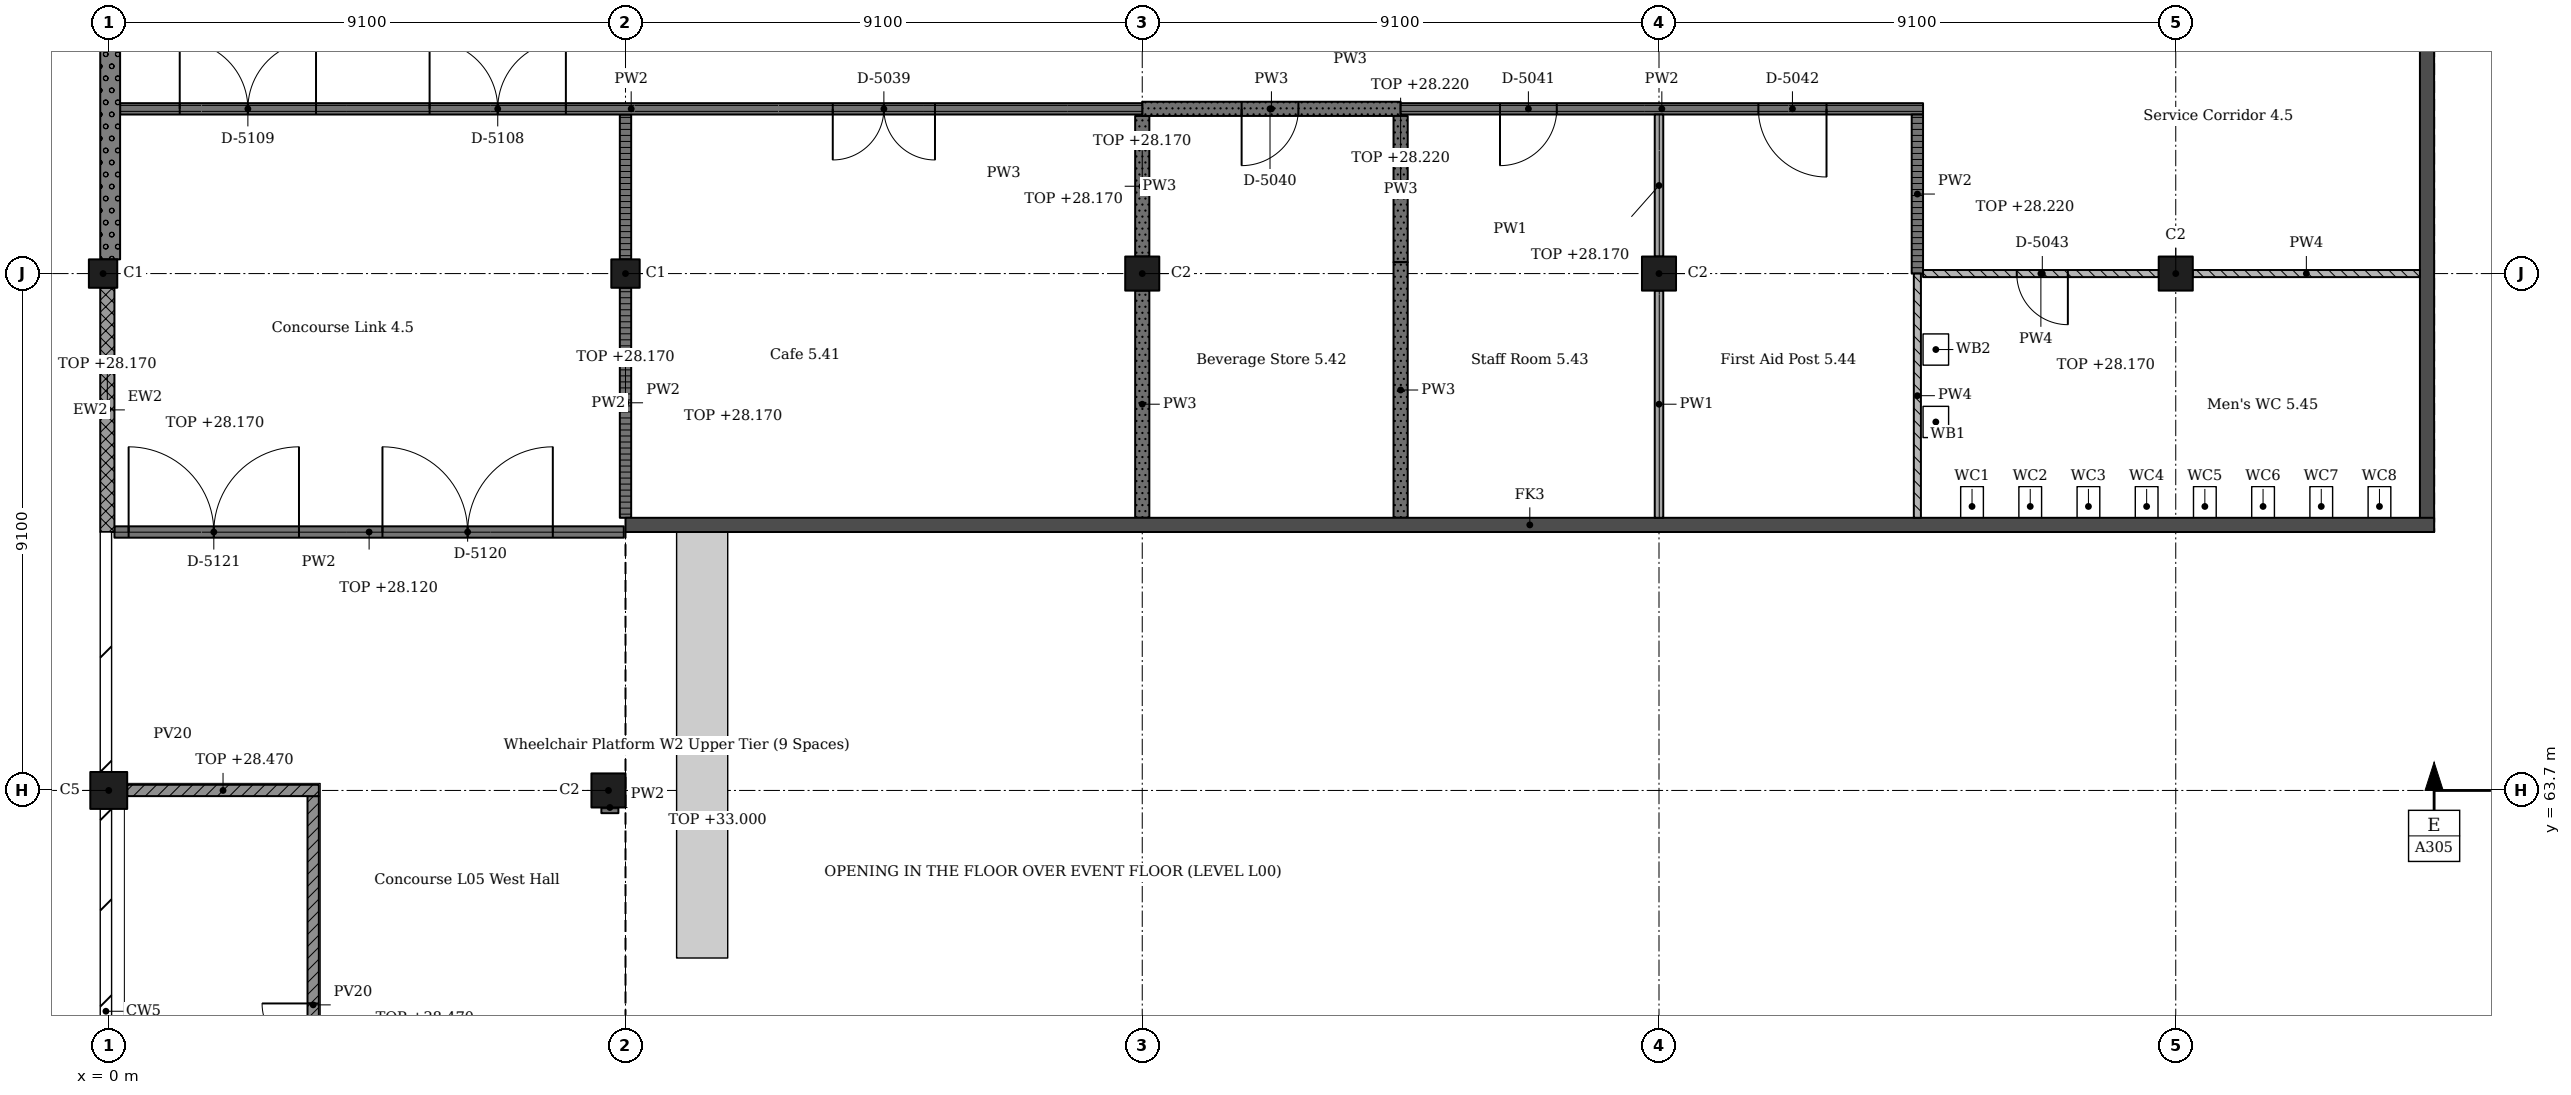
"""IFC4 building model, lengths in metres.
Left out: names, types, materials, properties, quantities, classifications, styles, units other than length and angle.
Written with IfcOpenShell. Run it as: python <this file> out.ifc"""

import sys

from ifc_helpers import new_model, si_unit, direction, frame, frame_2d, origin, origin_2d, place, context, subcontext, project, spatial, rectangle, extrude, element, fill, save


model = new_model("IFC4")
c1 = context("Model", 3, precision=1e-05, world=origin(), true_north=direction((0.0, 1.0)))
c2 = subcontext(c1, "Body", "Model", "MODEL_VIEW")
j1 = project(units=[si_unit("LENGTHUNIT", "METRE"), si_unit("PLANEANGLEUNIT", "RADIAN")], contexts=[c1])
p1 = place(None, origin())
s1 = spatial("IfcSite", under=j1, at=p1, CompositionType="ELEMENT")
p2 = place(p1, origin())
s2 = spatial("IfcBuilding", under=s1, at=p2, CompositionType="ELEMENT")
p3 = place(p2, frame((0.0, 0.0, 24.57)))
s3 = spatial("IfcBuildingStorey", under=s2, at=p3, CompositionType="ELEMENT", Elevation=24.57)
p4 = place(p3, frame((0.0, 63.7, 0.0), z_axis=(0.0, 0.0, 1.0), x_axis=(1.0, 0.0, 0.0)))
e1 = element("IfcColumn", 1, at=p4, inside=s3, PredefinedType="COLUMN", context=c2, shape_type="SweptSolid", body=[
    extrude(rectangle(XDim=0.65, YDim=0.65, at=origin_2d()), origin(), (0.0, 0.0, 1.0), 4.55),
])
p5 = place(p3, frame((-0.1, 72.8, 0.0), z_axis=(0.0, 0.0, 1.0), x_axis=(1.0, 0.0, 0.0)))
e2 = element("IfcColumn", 2, at=p5, inside=s3, PredefinedType="COLUMN", context=c2, shape_type="SweptSolid", body=[
    extrude(rectangle(XDim=0.5, YDim=0.5, at=origin_2d()), origin(), (0.0, 0.0, 1.0), 4.55),
])
p6 = place(p3, frame((8.8, 63.7, 0.0), z_axis=(0.0, 0.0, 1.0), x_axis=(1.0, 0.0, 0.0)))
e3 = element("IfcColumn", 3, at=p6, inside=s3, PredefinedType="COLUMN", context=c2, shape_type="SweptSolid", body=[
    extrude(rectangle(XDim=0.6, YDim=0.6, at=origin_2d()), origin(), (0.0, 0.0, 1.0), 4.55),
])
p7 = place(p3, frame((9.1, 72.8, 0.0), z_axis=(0.0, 0.0, 1.0), x_axis=(1.0, 0.0, 0.0)))
e4 = element("IfcColumn", 4, at=p7, inside=s3, PredefinedType="COLUMN", context=c2, shape_type="SweptSolid", body=[
    extrude(rectangle(XDim=0.5, YDim=0.5, at=origin_2d()), origin(), (0.0, 0.0, 1.0), 4.55),
])
for number, where, z_axis, x_axis in (
    (5, (18.2, 72.8, 0.0), (0.0, 0.0, 1.0), (1.0, 0.0, 0.0)),
    (6, (27.3, 72.8, 0.0), (0.0, 0.0, 1.0), (1.0, 0.0, 0.0)),
    (7, (36.4, 72.8, 0.0), (0.0, 0.0, 1.0), (1.0, 0.0, 0.0)),
):
    element("IfcColumn", number, at=place(p3, frame(where, z_axis=z_axis, x_axis=x_axis)), inside=s3, PredefinedType="COLUMN", context=c2, shape_type="SweptSolid", body=[
        extrude(rectangle(XDim=0.6, YDim=0.6, at=origin_2d()), origin(), (0.0, 0.0, 1.0), 4.55),
    ])
p8 = place(p3, frame((40.825, 68.25, 0.0), z_axis=(0.0, 0.0, 1.0), x_axis=(0.0, 1.0, 0.0)))
e8 = element("IfcWall", 8, at=p8, inside=s3, PredefinedType="SHEAR", context=c2, shape_type="SweptSolid", body=[
    extrude(rectangle(XDim=31.85, YDim=0.25, at=frame_2d((15.925, 0.0))), origin(), (0.0, 0.0, 1.0), 4.55),
])
p9 = place(p3, frame((40.95, 68.375, 0.0), z_axis=(0.0, 0.0, 1.0), x_axis=(-1.0, 0.0, 0.0)))
e9 = element("IfcWall", 9, at=p9, inside=s3, PredefinedType="SHEAR", context=c2, shape_type="SweptSolid", body=[
    extrude(rectangle(XDim=31.85, YDim=0.25, at=frame_2d((15.925, 0.0))), origin(), (0.0, 0.0, 1.0), 4.55),
])
p10 = place(p3, frame((0.025, 81.65, 0.0), z_axis=(0.0, 0.0, 1.0), x_axis=(0.0, -1.0, 0.0)))
e10 = element("IfcWall", 10, at=p10, inside=s3, PredefinedType="SOLIDWALL", context=c2, shape_type="SweptSolid", body=[
    extrude(rectangle(XDim=8.6, YDim=0.35, at=frame_2d((4.3, 0.0))), origin(), (0.0, 0.0, 1.0), 3.6),
])
p11 = place(p3, frame((-0.025, 72.55, 0.0), z_axis=(0.0, 0.0, 1.0), x_axis=(0.0, -1.0, 0.0)))
e11 = element("IfcWall", 11, at=p11, inside=s3, PredefinedType="SOLIDWALL", context=c2, shape_type="SweptSolid", body=[
    extrude(rectangle(XDim=4.3, YDim=0.25, at=frame_2d((2.15, 0.0))), origin(), (0.0, 0.0, 1.0), 3.6),
])
p12 = place(p3, frame((3.6, 54.6, 0.0), z_axis=(0.0, 0.0, 1.0), x_axis=(0.0, 1.0, 0.0)))
e12 = element("IfcWall", 12, at=p12, inside=s3, PredefinedType="PARTITIONING", context=c2, shape_type="SweptSolid", body=[
    extrude(rectangle(XDim=9.0, YDim=0.2, at=frame_2d((4.5, 0.0))), origin(), (0.0, 0.0, 1.0), 3.9),
])
p13 = place(p12, frame((3.55, 0.0, 0.0)))
e13 = element("IfcOpeningElement", 13, at=p13, cuts=e12, PredefinedType="OPENING", context=c2, shape_type="SweptSolid", body=[
    extrude(rectangle(XDim=1.8, YDim=2.1, at=frame_2d((0.9, 1.05))), frame((0.0, 0.11, 0.0), z_axis=(0.0, -1.0, 0.0), x_axis=(1.0, 0.0, 0.0)), (0.0, 0.0, 1.0), 0.22),
])
p14 = place(p3, frame((0.1, 68.25, 0.0), z_axis=(0.0, 0.0, 1.0), x_axis=(1.0, 0.0, 0.0)))
e14 = element("IfcWall", 14, at=p14, inside=s3, PredefinedType="PARTITIONING", context=c2, shape_type="SweptSolid", body=[
    extrude(rectangle(XDim=8.97, YDim=0.2, at=frame_2d((4.485, 0.0))), origin(), (0.0, 0.0, 1.0), 3.55),
])
p15 = place(p14, frame((4.72, 0.0, 0.0)))
e15 = element("IfcOpeningElement", 15, at=p15, cuts=e14, PredefinedType="OPENING", context=c2, shape_type="SweptSolid", body=[
    extrude(rectangle(XDim=3.0, YDim=2.4, at=frame_2d((1.5, 1.2))), frame((0.0, 0.11, 0.0), z_axis=(0.0, -1.0, 0.0), x_axis=(1.0, 0.0, 0.0)), (0.0, 0.0, 1.0), 0.22),
])
p16 = place(p14, frame((0.25, 0.0, 0.0)))
e16 = element("IfcOpeningElement", 16, at=p16, cuts=e14, PredefinedType="OPENING", context=c2, shape_type="SweptSolid", body=[
    extrude(rectangle(XDim=3.0, YDim=2.4, at=frame_2d((1.5, 1.2))), frame((0.0, 0.11, 0.0), z_axis=(0.0, -1.0, 0.0), x_axis=(1.0, 0.0, 0.0)), (0.0, 0.0, 1.0), 0.22),
])
p17 = place(p3, frame((3.7, 63.7, 0.0), z_axis=(0.0, 0.0, 1.0), x_axis=(-1.0, 0.0, 0.0)))
e17 = element("IfcWall", 17, at=p17, inside=s3, PredefinedType="PARTITIONING", context=c2, shape_type="SweptSolid", body=[
    extrude(rectangle(XDim=3.375, YDim=0.2, at=frame_2d((1.688, 0.0))), origin(), (0.0, 0.0, 1.0), 3.9),
])
p18 = place(p3, frame((8.675, 63.4, 0.0), z_axis=(0.0, 0.0, 1.0), x_axis=(1.0, 0.0, 0.0)))
e18 = element("IfcWall", 18, at=p18, inside=s3, PredefinedType="PARTITIONING", context=c2, shape_type="SweptSolid", body=[
    extrude(rectangle(XDim=0.3, YDim=0.2, at=frame_2d((0.15, 0.0))), origin(), (0.0, 0.0, 1.0), 8.43),
])
p19 = place(p3, frame((9.1, 68.5, 0.0), z_axis=(0.0, 0.0, 1.0), x_axis=(0.0, 1.0, 0.0)))
e19 = element("IfcWall", 19, at=p19, inside=s3, PredefinedType="PARTITIONING", context=c2, shape_type="SweptSolid", body=[
    extrude(rectangle(XDim=4.05, YDim=0.2, at=frame_2d((2.025, 0.0))), origin(), (0.0, 0.0, 1.0), 3.6),
])
p20 = place(p3, frame((9.1, 73.05, 0.0), z_axis=(0.0, 0.0, 1.0), x_axis=(0.0, 1.0, 0.0)))
e20 = element("IfcWall", 20, at=p20, inside=s3, PredefinedType="PARTITIONING", context=c2, shape_type="SweptSolid", body=[
    extrude(rectangle(XDim=2.55, YDim=0.2, at=frame_2d((1.275, 0.0))), origin(), (0.0, 0.0, 1.0), 3.6),
])
p21 = place(p3, frame((0.2, 75.7, 0.0), z_axis=(0.0, 0.0, 1.0), x_axis=(1.0, 0.0, 0.0)))
e21 = element("IfcWall", 21, at=p21, inside=s3, PredefinedType="PARTITIONING", context=c2, shape_type="SweptSolid", body=[
    extrude(rectangle(XDim=18.0, YDim=0.2, at=frame_2d((9.0, 0.0))), origin(), (0.0, 0.0, 1.0), 4.35),
])
p22 = place(p21, frame((12.55, 0.0, 0.0)))
e22 = element("IfcOpeningElement", 22, at=p22, cuts=e21, PredefinedType="OPENING", context=c2, shape_type="SweptSolid", body=[
    extrude(rectangle(XDim=1.8, YDim=2.1, at=frame_2d((0.9, 1.05))), frame((0.0, 0.11, 0.0), z_axis=(0.0, -1.0, 0.0), x_axis=(1.0, 0.0, 0.0)), (0.0, 0.0, 1.0), 0.22),
])
p23 = place(p21, frame((5.45, 0.0, 0.0)))
e23 = element("IfcOpeningElement", 23, at=p23, cuts=e21, PredefinedType="OPENING", context=c2, shape_type="SweptSolid", body=[
    extrude(rectangle(XDim=2.4, YDim=2.4, at=frame_2d((1.2, 1.2))), frame((0.0, 0.11, 0.0), z_axis=(0.0, -1.0, 0.0), x_axis=(1.0, 0.0, 0.0)), (0.0, 0.0, 1.0), 0.22),
])
p24 = place(p21, frame((1.05, 0.0, 0.0)))
e24 = element("IfcOpeningElement", 24, at=p24, cuts=e21, PredefinedType="OPENING", context=c2, shape_type="SweptSolid", body=[
    extrude(rectangle(XDim=2.4, YDim=2.4, at=frame_2d((1.2, 1.2))), frame((0.0, 0.11, 0.0), z_axis=(0.0, -1.0, 0.0), x_axis=(1.0, 0.0, 0.0)), (0.0, 0.0, 1.0), 0.22),
])
p25 = place(p3, frame((18.2, 72.5, 0.0), z_axis=(0.0, 0.0, 1.0), x_axis=(0.0, -1.0, 0.0)))
e25 = element("IfcWall", 25, at=p25, inside=s3, PredefinedType="SOLIDWALL", context=c2, shape_type="SweptSolid", body=[
    extrude(rectangle(XDim=4.0, YDim=0.25, at=frame_2d((2.0, 0.0))), origin(), (0.0, 0.0, 1.0), 4.35),
])
p26 = place(p3, frame((18.2, 75.575, 0.0), z_axis=(0.0, 0.0, 1.0), x_axis=(0.0, -1.0, 0.0)))
e26 = element("IfcWall", 26, at=p26, inside=s3, PredefinedType="SOLIDWALL", context=c2, shape_type="SweptSolid", body=[
    extrude(rectangle(XDim=2.475, YDim=0.25, at=frame_2d((1.237, 0.0))), origin(), (0.0, 0.0, 1.0), 3.6),
])
p27 = place(p3, frame((18.2, 75.7, 0.0), z_axis=(0.0, 0.0, 1.0), x_axis=(1.0, 0.0, 0.0)))
e27 = element("IfcWall", 27, at=p27, inside=s3, PredefinedType="SOLIDWALL", context=c2, shape_type="SweptSolid", body=[
    extrude(rectangle(XDim=4.55, YDim=0.25, at=frame_2d((2.275, 0.0))), origin(), (0.0, 0.0, 1.0), 4.35),
])
p28 = place(p27, frame((1.75, 0.0, 0.0)))
e28 = element("IfcOpeningElement", 28, at=p28, cuts=e27, PredefinedType="OPENING", context=c2, shape_type="SweptSolid", body=[
    extrude(rectangle(XDim=1.0, YDim=2.1, at=frame_2d((0.5, 1.05))), frame((0.0, 0.135, 0.0), z_axis=(0.0, -1.0, 0.0), x_axis=(1.0, 0.0, 0.0)), (0.0, 0.0, 1.0), 0.27),
])
p29 = place(p3, frame((22.75, 75.575, 0.0), z_axis=(0.0, 0.0, 1.0), x_axis=(0.0, -1.0, 0.0)))
e29 = element("IfcWall", 29, at=p29, inside=s3, PredefinedType="SOLIDWALL", context=c2, shape_type="SweptSolid", body=[
    extrude(rectangle(XDim=2.575, YDim=0.25, at=frame_2d((1.288, 0.0))), origin(), (0.0, 0.0, 1.0), 3.65),
])
p30 = place(p3, frame((22.75, 75.7, 0.0), z_axis=(0.0, 0.0, 1.0), x_axis=(1.0, 0.0, 0.0)))
e30 = element("IfcWall", 30, at=p30, inside=s3, PredefinedType="PARTITIONING", context=c2, shape_type="SweptSolid", body=[
    extrude(rectangle(XDim=9.2, YDim=0.2, at=frame_2d((4.6, 0.0))), origin(), (0.0, 0.0, 1.0), 4.35),
])
p31 = place(p30, frame((1.75, 0.0, 0.0)))
e31 = element("IfcOpeningElement", 31, at=p31, cuts=e30, PredefinedType="OPENING", context=c2, shape_type="SweptSolid", body=[
    extrude(rectangle(XDim=1.0, YDim=2.1, at=frame_2d((0.5, 1.05))), frame((0.0, 0.11, 0.0), z_axis=(0.0, -1.0, 0.0), x_axis=(1.0, 0.0, 0.0)), (0.0, 0.0, 1.0), 0.22),
])
p32 = place(p30, frame((6.3, 0.0, 0.0)))
e32 = element("IfcOpeningElement", 32, at=p32, cuts=e30, PredefinedType="OPENING", context=c2, shape_type="SweptSolid", body=[
    extrude(rectangle(XDim=1.2, YDim=2.1, at=frame_2d((0.6, 1.05))), frame((0.0, 0.11, 0.0), z_axis=(0.0, -1.0, 0.0), x_axis=(1.0, 0.0, 0.0)), (0.0, 0.0, 1.0), 0.22),
])
p33 = place(p3, frame((27.3, 72.5, 0.0), z_axis=(0.0, 0.0, 1.0), x_axis=(0.0, -1.0, 0.0)))
e33 = element("IfcWall", 33, at=p33, inside=s3, PredefinedType="PARTITIONING", context=c2, shape_type="SweptSolid", body=[
    extrude(rectangle(XDim=4.0, YDim=0.15, at=frame_2d((2.0, 0.0))), origin(), (0.0, 0.0, 1.0), 4.35),
])
p34 = place(p3, frame((27.3, 75.6, 0.0), z_axis=(0.0, 0.0, 1.0), x_axis=(0.0, -1.0, 0.0)))
e34 = element("IfcWall", 34, at=p34, inside=s3, PredefinedType="PARTITIONING", context=c2, shape_type="SweptSolid", body=[
    extrude(rectangle(XDim=2.5, YDim=0.15, at=frame_2d((1.25, 0.0))), origin(), (0.0, 0.0, 1.0), 3.6),
])
p35 = place(p3, frame((31.85, 72.8, 0.0), z_axis=(0.0, 0.0, 1.0), x_axis=(0.0, -1.0, 0.0)))
e35 = element("IfcWall", 35, at=p35, inside=s3, PredefinedType="PARTITIONING", context=c2, shape_type="SweptSolid", body=[
    extrude(rectangle(XDim=4.3, YDim=0.125, at=frame_2d((2.15, 0.0))), origin(), (0.0, 0.0, 1.0), 4.35),
])
p36 = place(p3, frame((31.85, 75.6, 0.0), z_axis=(0.0, 0.0, 1.0), x_axis=(0.0, -1.0, 0.0)))
e36 = element("IfcWall", 36, at=p36, inside=s3, PredefinedType="PARTITIONING", context=c2, shape_type="SweptSolid", body=[
    extrude(rectangle(XDim=2.8, YDim=0.2, at=frame_2d((1.4, 0.0))), origin(), (0.0, 0.0, 1.0), 3.65),
])
p37 = place(p3, frame((31.95, 72.8, 0.0), z_axis=(0.0, 0.0, 1.0), x_axis=(1.0, 0.0, 0.0)))
e37 = element("IfcWall", 37, at=p37, inside=s3, PredefinedType="PARTITIONING", context=c2, shape_type="SweptSolid", body=[
    extrude(rectangle(XDim=4.15, YDim=0.125, at=frame_2d((2.075, 0.0))), origin(), (0.0, 0.0, 1.0), 3.6),
])
p38 = place(p37, frame((1.65, 0.0, 0.0)))
e38 = element("IfcOpeningElement", 38, at=p38, cuts=e37, PredefinedType="OPENING", context=c2, shape_type="SweptSolid", body=[
    extrude(rectangle(XDim=0.9, YDim=2.1, at=frame_2d((0.45, 1.05))), frame((0.0, 0.073, 0.0), z_axis=(0.0, -1.0, 0.0), x_axis=(1.0, 0.0, 0.0)), (0.0, 0.0, 1.0), 0.145),
])
p39 = place(p3, frame((36.7, 72.8, 0.0), z_axis=(0.0, 0.0, 1.0), x_axis=(1.0, 0.0, 0.0)))
e39 = element("IfcWall", 39, at=p39, inside=s3, PredefinedType="PARTITIONING", context=c2, shape_type="SweptSolid", body=[
    extrude(rectangle(XDim=4.0, YDim=0.125, at=frame_2d((2.0, 0.0))), origin(), (0.0, 0.0, 1.0), 4.35),
])
p40 = place(p3, frame((22.75, 73.0, 0.0), z_axis=(0.0, 0.0, 1.0), x_axis=(0.0, -1.0, 0.0)))
e40 = element("IfcWall", 40, at=p40, inside=s3, PredefinedType="SOLIDWALL", context=c2, shape_type="SweptSolid", body=[
    extrude(rectangle(XDim=4.5, YDim=0.25, at=frame_2d((2.25, 0.0))), origin(), (0.0, 0.0, 1.0), 4.35),
])
p41 = place(p22, origin())
e41 = element("IfcDoor", 41, at=p41, inside=s3, OperationType="DOUBLE_DOOR_SINGLE_SWING", PredefinedType="DOOR", context=c2, shape_type="SweptSolid", body=[
    extrude(rectangle(XDim=1.8, YDim=2.1, at=frame_2d((0.9, 1.05))), frame((0.0, 0.025, 0.0), z_axis=(0.0, -1.0, 0.0), x_axis=(1.0, 0.0, 0.0)), (0.0, 0.0, 1.0), 0.05),
])
fill(e22, e41)
p42 = place(p28, origin())
e42 = element("IfcDoor", 42, at=p42, inside=s3, OperationType="SINGLE_SWING_LEFT", PredefinedType="DOOR", context=c2, shape_type="SweptSolid", body=[
    extrude(rectangle(XDim=1.0, YDim=2.1, at=frame_2d((0.5, 1.05))), frame((0.0, 0.025, 0.0), z_axis=(0.0, -1.0, 0.0), x_axis=(1.0, 0.0, 0.0)), (0.0, 0.0, 1.0), 0.05),
])
fill(e28, e42)
p43 = place(p31, origin())
e43 = element("IfcDoor", 43, at=p43, inside=s3, OperationType="SINGLE_SWING_LEFT", PredefinedType="DOOR", context=c2, shape_type="SweptSolid", body=[
    extrude(rectangle(XDim=1.0, YDim=2.1, at=frame_2d((0.5, 1.05))), frame((0.0, 0.025, 0.0), z_axis=(0.0, -1.0, 0.0), x_axis=(1.0, 0.0, 0.0)), (0.0, 0.0, 1.0), 0.05),
])
fill(e31, e43)
p44 = place(p32, origin())
e44 = element("IfcDoor", 44, at=p44, inside=s3, OperationType="SINGLE_SWING_RIGHT", PredefinedType="DOOR", context=c2, shape_type="SweptSolid", body=[
    extrude(rectangle(XDim=1.2, YDim=2.1, at=frame_2d((0.6, 1.05))), frame((0.0, 0.025, 0.0), z_axis=(0.0, -1.0, 0.0), x_axis=(1.0, 0.0, 0.0)), (0.0, 0.0, 1.0), 0.05),
])
fill(e32, e44)
p45 = place(p38, origin())
e45 = element("IfcDoor", 45, at=p45, inside=s3, OperationType="SINGLE_SWING_RIGHT", PredefinedType="DOOR", context=c2, shape_type="SweptSolid", body=[
    extrude(rectangle(XDim=0.9, YDim=2.1, at=frame_2d((0.45, 1.05))), frame((0.0, 0.025, 0.0), z_axis=(0.0, -1.0, 0.0), x_axis=(1.0, 0.0, 0.0)), (0.0, 0.0, 1.0), 0.05),
])
fill(e38, e45)
p46 = place(p13, origin())
e46 = element("IfcDoor", 46, at=p46, inside=s3, OperationType="DOUBLE_DOOR_SINGLE_SWING", PredefinedType="DOOR", context=c2, shape_type="SweptSolid", body=[
    extrude(rectangle(XDim=1.8, YDim=2.1, at=frame_2d((0.9, 1.05))), frame((0.0, 0.025, 0.0), z_axis=(0.0, -1.0, 0.0), x_axis=(1.0, 0.0, 0.0)), (0.0, 0.0, 1.0), 0.05),
])
fill(e13, e46)
p47 = place(p23, origin())
e47 = element("IfcDoor", 47, at=p47, inside=s3, OperationType="DOUBLE_DOOR_SINGLE_SWING", PredefinedType="DOOR", context=c2, shape_type="SweptSolid", body=[
    extrude(rectangle(XDim=2.4, YDim=2.4, at=frame_2d((1.2, 1.2))), frame((0.0, 0.025, 0.0), z_axis=(0.0, -1.0, 0.0), x_axis=(1.0, 0.0, 0.0)), (0.0, 0.0, 1.0), 0.05),
])
fill(e23, e47)
p48 = place(p24, origin())
e48 = element("IfcDoor", 48, at=p48, inside=s3, OperationType="DOUBLE_DOOR_SINGLE_SWING", PredefinedType="DOOR", context=c2, shape_type="SweptSolid", body=[
    extrude(rectangle(XDim=2.4, YDim=2.4, at=frame_2d((1.2, 1.2))), frame((0.0, 0.025, 0.0), z_axis=(0.0, -1.0, 0.0), x_axis=(1.0, 0.0, 0.0)), (0.0, 0.0, 1.0), 0.05),
])
fill(e24, e48)
p49 = place(p15, origin())
e49 = element("IfcDoor", 49, at=p49, inside=s3, OperationType="DOUBLE_DOOR_SINGLE_SWING", PredefinedType="DOOR", context=c2, shape_type="SweptSolid", body=[
    extrude(rectangle(XDim=3.0, YDim=2.4, at=frame_2d((1.5, 1.2))), frame((0.0, 0.025, 0.0), z_axis=(0.0, -1.0, 0.0), x_axis=(1.0, 0.0, 0.0)), (0.0, 0.0, 1.0), 0.05),
])
fill(e15, e49)
p50 = place(p16, origin())
e50 = element("IfcDoor", 50, at=p50, inside=s3, OperationType="DOUBLE_DOOR_SINGLE_SWING", PredefinedType="DOOR", context=c2, shape_type="SweptSolid", body=[
    extrude(rectangle(XDim=3.0, YDim=2.4, at=frame_2d((1.5, 1.2))), frame((0.0, 0.025, 0.0), z_axis=(0.0, -1.0, 0.0), x_axis=(1.0, 0.0, 0.0)), (0.0, 0.0, 1.0), 0.05),
])
fill(e16, e50)
save(model, sys.argv[1])
